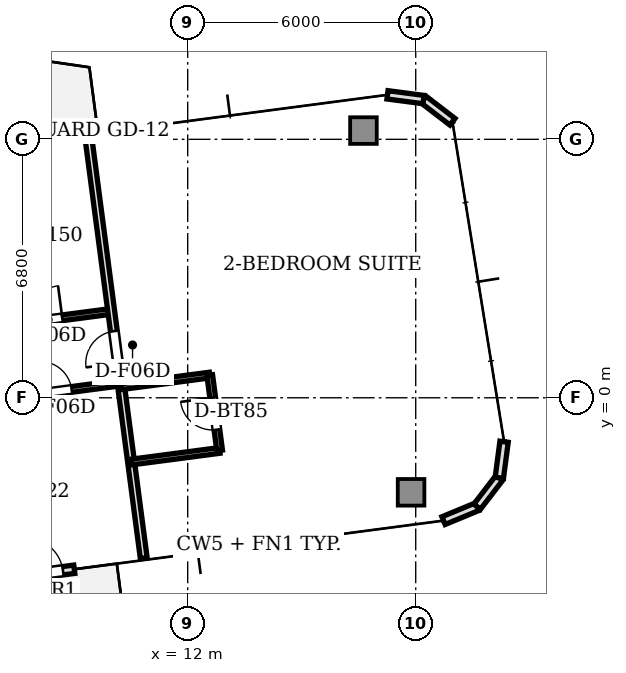
"""IFC4 building model, lengths in metres.
Left out: names, types, materials, properties, quantities, classifications, styles, units other than length and angle.
Written with IfcOpenShell. Run it as: python <this file> out.ifc"""

import sys

from ifc_helpers import new_model, si_unit, direction, frame, frame_2d, origin, origin_2d, place, context, subcontext, project, spatial, rectangle, extrude, source, transform, mapped, element, fill, save


model = new_model("IFC4")
c1 = context("Model", 3, precision=1e-05, world=origin(), true_north=direction((0.0, 1.0)))
c2 = subcontext(c1, "Body", "Model", "MODEL_VIEW")
j1 = project(units=[si_unit("LENGTHUNIT", "METRE"), si_unit("PLANEANGLEUNIT", "RADIAN")], contexts=[c1])
p1 = place(None, origin())
s1 = spatial("IfcSite", under=j1, at=p1, CompositionType="ELEMENT")
p2 = place(p1, origin())
s2 = spatial("IfcBuilding", under=s1, at=p2, CompositionType="ELEMENT")
p3 = place(p2, frame((0.0, 0.0, 209.85)))
s3 = spatial("IfcBuildingStorey", under=s2, at=p3, CompositionType="ELEMENT", Elevation=209.85)
m1 = source(origin(), c2, "Body", "SweptSolid", [
    extrude(rectangle(XDim=0.7, YDim=0.7, at=origin_2d()), origin(), (0.0, 0.0, 1.0), 3.11),
])
for number, where, z_axis, x_axis in (
    (1, (17.878, -2.488, 0.0), (0.0, 0.0, 1.0), (1.0, 0.0, 0.0)),
    (2, (16.625, 7.03, 0.0), (0.0, 0.0, 1.0), (1.0, 0.0, 0.0)),
):
    element("IfcColumn", number, at=place(p3, frame(where, z_axis=z_axis, x_axis=x_axis)), inside=s3, PredefinedType="COLUMN", context=c2, shape_type="MappedRepresentation", body=[
        mapped(m1, transform((0.0, 0.0, 0.0), scale=1.0)),
    ])
p4 = place(p3, frame((6.339, -4.864, 0.0), z_axis=(0.0, 0.0, 1.0), x_axis=(0.991439824936, 0.130564442062, 0.0)))
e3 = element("IfcWall", 3, at=p4, inside=s3, PredefinedType="STANDARD", context=c2, shape_type="SweptSolid", body=[
    extrude(rectangle(XDim=2.7, YDim=0.22, at=frame_2d((1.35, 0.0))), origin(), (0.0, 0.0, 1.0), 3.11),
])
p5 = place(p4, frame((1.4, 0.0, 0.0)))
e4 = element("IfcOpeningElement", 4, at=p5, cuts=e3, PredefinedType="OPENING", context=c2, shape_type="SweptSolid", body=[
    extrude(rectangle(XDim=1.0, YDim=2.2, at=frame_2d((0.5, 1.1))), frame((0.0, 0.12, 0.0), z_axis=(0.0, -1.0, 0.0), x_axis=(1.0, 0.0, 0.0)), (0.0, 0.0, 1.0), 0.24),
])
for number, where, z_axis, x_axis in (
    (5, (18.732, -3.233, 0.0), (0.0, 0.0, 1.0), (0.924, 0.383, 0.0)),
    (6, (19.617, -2.866, 0.0), (0.0, 0.0, 1.0), (0.609, 0.793, 0.0)),
    (7, (20.2, -2.106, 0.0), (0.0, 0.0, 1.0), (0.131, 0.991, 0.0)),
):
    element("IfcWall", number, at=place(p3, frame(where, z_axis=z_axis, x_axis=x_axis)), inside=s3, PredefinedType="STANDARD", context=c2, shape_type="SweptSolid", body=[
        extrude(rectangle(XDim=0.958, YDim=0.22, at=frame_2d((0.479, 0.0))), origin(), (0.0, 0.0, 1.0), 3.11),
    ])
p6 = place(p3, frame((18.966, 7.263, 0.0), z_axis=(0.0, 0.0, 1.0), x_axis=(-0.793249178392, 0.608897151398, 0.0)))
e8 = element("IfcWall", 8, at=p6, inside=s3, PredefinedType="STANDARD", context=c2, shape_type="SweptSolid", body=[
    extrude(rectangle(XDim=0.958, YDim=0.22, at=frame_2d((0.479, 0.0))), origin(), (0.0, 0.0, 1.0), 3.11),
])
p7 = place(p3, frame((18.207, 7.846, 0.0), z_axis=(0.0, 0.0, 1.0), x_axis=(-0.991444747987, 0.130527053476, 0.0)))
e9 = element("IfcWall", 9, at=p7, inside=s3, PredefinedType="STANDARD", context=c2, shape_type="SweptSolid", body=[
    extrude(rectangle(XDim=0.958, YDim=0.22, at=frame_2d((0.479, 0.0))), origin(), (0.0, 0.0, 1.0), 3.11),
])
p8 = place(p3, frame((6.667, 1.836, 0.0), z_axis=(0.0, 0.0, 1.0), x_axis=(0.991444866817, 0.130526150873, 0.0)))
e10 = element("IfcWall", 10, at=p8, inside=s3, PredefinedType="PARTITIONING", context=c2, shape_type="SweptSolid", body=[
    extrude(rectangle(XDim=3.35, YDim=0.15, at=frame_2d((1.675, 0.0))), origin(), (0.0, 0.0, 1.0), 2.66),
])
p9 = place(p8, frame((1.2, 0.0, 0.0)))
e11 = element("IfcOpeningElement", 11, at=p9, cuts=e10, PredefinedType="OPENING", context=c2, shape_type="SweptSolid", body=[
    extrude(rectangle(XDim=0.85, YDim=2.1, at=frame_2d((0.425, 1.05))), frame((0.0, 0.085, 0.0), z_axis=(0.0, -1.0, 0.0), x_axis=(1.0, 0.0, 0.0)), (0.0, 0.0, 1.0), 0.17),
])
p10 = place(p3, frame((6.915, -0.048, 0.0), z_axis=(0.0, 0.0, 1.0), x_axis=(0.991446108327, 0.130516720324, 0.0)))
e12 = element("IfcWall", 12, at=p10, inside=s3, PredefinedType="PARTITIONING", context=c2, shape_type="SweptSolid", body=[
    extrude(rectangle(XDim=3.35, YDim=0.15, at=frame_2d((1.675, 0.0))), origin(), (0.0, 0.0, 1.0), 2.66),
])
p11 = place(p10, frame((1.2, 0.0, 0.0)))
e13 = element("IfcOpeningElement", 13, at=p11, cuts=e12, PredefinedType="OPENING", context=c2, shape_type="SweptSolid", body=[
    extrude(rectangle(XDim=0.85, YDim=2.1, at=frame_2d((0.425, 1.05))), frame((0.0, 0.085, 0.0), z_axis=(0.0, -1.0, 0.0), x_axis=(1.0, 0.0, 0.0)), (0.0, 0.0, 1.0), 0.17),
])
p12 = place(p3, frame((10.844, -4.221, 0.0), z_axis=(0.0, 0.0, 1.0), x_axis=(-0.130527251821, 0.991444721874, 0.0)))
e14 = element("IfcWall", 14, at=p12, inside=s3, PredefinedType="PARTITIONING", context=c2, shape_type="SweptSolid", body=[
    extrude(rectangle(XDim=11.2, YDim=0.18, at=frame_2d((5.6, 0.0))), origin(), (0.0, 0.0, 1.0), 2.66),
])
p13 = place(p12, frame((5.175, 0.0, 0.0)))
e15 = element("IfcOpeningElement", 15, at=p13, cuts=e14, PredefinedType="OPENING", context=c2, shape_type="SweptSolid", body=[
    extrude(rectangle(XDim=0.85, YDim=2.1, at=frame_2d((0.425, 1.05))), frame((0.0, 0.1, 0.0), z_axis=(0.0, -1.0, 0.0), x_axis=(1.0, 0.0, 0.0)), (0.0, 0.0, 1.0), 0.2),
])
p14 = place(p3, frame((10.25, 0.29, 0.0), z_axis=(0.0, 0.0, 1.0), x_axis=(0.991436251812, 0.130591571678, 0.0)))
e16 = element("IfcWall", 16, at=p14, inside=s3, PredefinedType="PARTITIONING", context=c2, shape_type="SweptSolid", body=[
    extrude(rectangle(XDim=2.35, YDim=0.15, at=frame_2d((1.175, 0.0))), origin(), (0.0, 0.0, 1.0), 2.66),
])
p15 = place(p3, frame((10.511, -1.692, 0.0), z_axis=(0.0, 0.0, 1.0), x_axis=(0.991451466659, 0.130476010281, 0.0)))
e17 = element("IfcWall", 17, at=p15, inside=s3, PredefinedType="PARTITIONING", context=c2, shape_type="SweptSolid", body=[
    extrude(rectangle(XDim=2.35, YDim=0.15, at=frame_2d((1.175, 0.0))), origin(), (0.0, 0.0, 1.0), 2.66),
])
p16 = place(p3, frame((12.841, -1.386, 0.0), z_axis=(0.0, 0.0, 1.0), x_axis=(-0.130612392842, 0.991433509034, 0.0)))
e18 = element("IfcWall", 18, at=p16, inside=s3, PredefinedType="PARTITIONING", context=c2, shape_type="SweptSolid", body=[
    extrude(rectangle(XDim=2.0, YDim=0.15, at=frame_2d((1.0, 0.0))), origin(), (0.0, 0.0, 1.0), 2.66),
])
p17 = place(p16, frame((0.55, 0.0, 0.0)))
e19 = element("IfcOpeningElement", 19, at=p17, cuts=e18, PredefinedType="OPENING", context=c2, shape_type="SweptSolid", body=[
    extrude(rectangle(XDim=0.85, YDim=2.1, at=frame_2d((0.425, 1.05))), frame((0.0, 0.085, 0.0), z_axis=(0.0, -1.0, 0.0), x_axis=(1.0, 0.0, 0.0)), (0.0, 0.0, 1.0), 0.17),
])
m2 = source(origin(), c2, "Body", "SweptSolid", [
    extrude(rectangle(XDim=1.0, YDim=0.05, at=origin_2d()), origin(), (0.0, 0.0, 1.0), 2.2),
])
p18 = place(p5, frame((0.5, 0.0, 0.0)))
e20 = element("IfcDoor", 20, at=p18, inside=s3, OperationType="SINGLE_SWING_LEFT", PredefinedType="DOOR", context=c2, shape_type="MappedRepresentation", body=[
    mapped(m2, transform((0.0, 0.0, 0.0), scale=1.0)),
])
fill(e4, e20)
m3 = source(origin(), c2, "Body", "SweptSolid", [
    extrude(rectangle(XDim=0.85, YDim=0.05, at=origin_2d()), origin(), (0.0, 0.0, 1.0), 2.1),
])
p19 = place(p9, frame((0.425, 0.0, 0.0)))
e21 = element("IfcDoor", 21, at=p19, inside=s3, OperationType="SINGLE_SWING_RIGHT", PredefinedType="DOOR", context=c2, shape_type="MappedRepresentation", body=[
    mapped(m3, transform((0.0, 0.0, 0.0), scale=1.0)),
])
fill(e11, e21)
p20 = place(p11, frame((0.425, 0.0, 0.0)))
e22 = element("IfcDoor", 22, at=p20, inside=s3, OperationType="SINGLE_SWING_LEFT", PredefinedType="DOOR", context=c2, shape_type="MappedRepresentation", body=[
    mapped(m3, transform((0.0, 0.0, 0.0), scale=1.0)),
])
fill(e13, e22)
p21 = place(p17, frame((0.425, 0.0, 0.0)))
e23 = element("IfcDoor", 23, at=p21, inside=s3, OperationType="SINGLE_SWING_RIGHT", PredefinedType="DOOR", context=c2, shape_type="MappedRepresentation", body=[
    mapped(m3, transform((0.0, 0.0, 0.0), scale=1.0)),
])
fill(e19, e23)
p22 = place(p13, frame((0.425, 0.0, 0.0)))
e24 = element("IfcDoor", 24, at=p22, inside=s3, OperationType="SINGLE_SWING_LEFT", PredefinedType="DOOR", context=c2, shape_type="MappedRepresentation", body=[
    mapped(m3, transform((0.0, 0.0, 0.0), scale=1.0)),
])
fill(e15, e24)
save(model, sys.argv[1])
